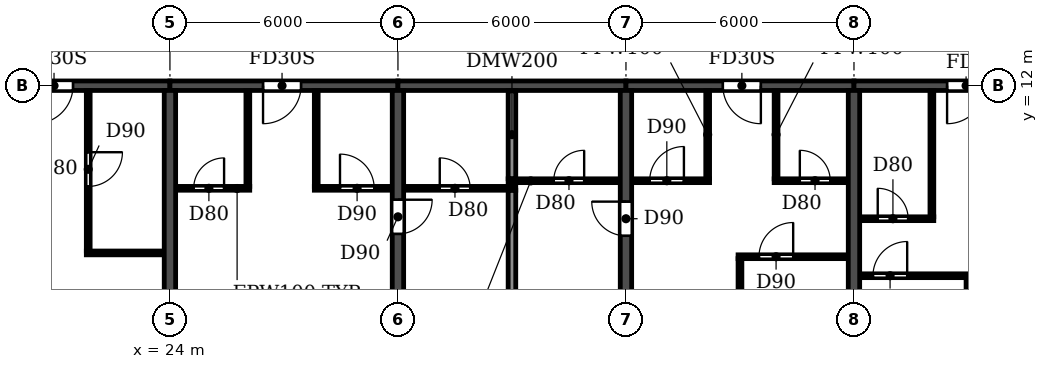
"""IFC4 building model, lengths in metres.
Left out: names, types, materials, properties, quantities, classifications, styles, units other than length and angle.
Written with IfcOpenShell. Run it as: python <this file> out.ifc"""

import sys

from ifc_helpers import new_model, si_unit, direction, frame, frame_2d, origin, place, context, subcontext, project, spatial, rectangle, extrude, element, fill, save


model = new_model("IFC4")
c1 = context("Model", 3, precision=1e-05, world=origin(), true_north=direction((0.0, 1.0)))
c2 = subcontext(c1, "Body", "Model", "MODEL_VIEW")
j1 = project(units=[si_unit("LENGTHUNIT", "METRE"), si_unit("PLANEANGLEUNIT", "RADIAN")], contexts=[c1])
p1 = place(None, origin())
s1 = spatial("IfcSite", under=j1, at=p1, CompositionType="ELEMENT")
p2 = place(p1, origin())
s2 = spatial("IfcBuilding", under=s1, at=p2, CompositionType="ELEMENT")
p3 = place(p2, frame((0.0, 0.0, 132.3)))
s3 = spatial("IfcBuildingStorey", under=s2, at=p3, CompositionType="ELEMENT", Elevation=132.3)
p4 = place(p3, frame((24.0, 0.2, 0.0), z_axis=(0.0, 0.0, 1.0), x_axis=(0.0, 1.0, 0.0)))
e1 = element("IfcWall", 1, at=p4, inside=s3, PredefinedType="SHEAR", context=c2, shape_type="SweptSolid", body=[
    extrude(rectangle(XDim=11.675, YDim=0.3, at=frame_2d((5.837, 0.0))), origin(), (0.0, 0.0, 1.0), 3.07),
])
p5 = place(p3, frame((30.0, 0.2, 0.0), z_axis=(0.0, 0.0, 1.0), x_axis=(0.0, 1.0, 0.0)))
e2 = element("IfcWall", 2, at=p5, inside=s3, PredefinedType="SHEAR", context=c2, shape_type="SweptSolid", body=[
    extrude(rectangle(XDim=11.675, YDim=0.3, at=frame_2d((5.837, 0.0))), origin(), (0.0, 0.0, 1.0), 3.07),
])
p6 = place(p5, frame((7.9, 0.0, 0.0)))
e3 = element("IfcOpeningElement", 3, at=p6, cuts=e2, PredefinedType="OPENING", context=c2, shape_type="SweptSolid", body=[
    extrude(rectangle(XDim=0.9, YDim=2.1, at=frame_2d((0.45, 1.05))), frame((0.0, 0.16, 0.0), z_axis=(0.0, -1.0, 0.0), x_axis=(1.0, 0.0, 0.0)), (0.0, 0.0, 1.0), 0.32),
])
p7 = place(p3, frame((36.0, 0.2, 0.0), z_axis=(0.0, 0.0, 1.0), x_axis=(0.0, 1.0, 0.0)))
e4 = element("IfcWall", 4, at=p7, inside=s3, PredefinedType="SHEAR", context=c2, shape_type="SweptSolid", body=[
    extrude(rectangle(XDim=11.675, YDim=0.3, at=frame_2d((5.837, 0.0))), origin(), (0.0, 0.0, 1.0), 3.07),
])
p8 = place(p7, frame((7.85, 0.0, 0.0)))
e5 = element("IfcOpeningElement", 5, at=p8, cuts=e4, PredefinedType="OPENING", context=c2, shape_type="SweptSolid", body=[
    extrude(rectangle(XDim=0.9, YDim=2.1, at=frame_2d((0.45, 1.05))), frame((0.0, 0.16, 0.0), z_axis=(0.0, -1.0, 0.0), x_axis=(1.0, 0.0, 0.0)), (0.0, 0.0, 1.0), 0.32),
])
p9 = place(p3, frame((42.0, 0.2, 0.0), z_axis=(0.0, 0.0, 1.0), x_axis=(0.0, 1.0, 0.0)))
e6 = element("IfcWall", 6, at=p9, inside=s3, PredefinedType="SHEAR", context=c2, shape_type="SweptSolid", body=[
    extrude(rectangle(XDim=11.675, YDim=0.3, at=frame_2d((5.837, 0.0))), origin(), (0.0, 0.0, 1.0), 3.07),
])
p10 = place(p3, frame((18.0, 12.0, 0.0), z_axis=(0.0, 0.0, 1.0), x_axis=(1.0, 0.0, 0.0)))
e7 = element("IfcWall", 7, at=p10, inside=s3, PredefinedType="SHEAR", context=c2, shape_type="SweptSolid", body=[
    extrude(rectangle(XDim=6.0, YDim=0.25, at=frame_2d((3.0, 0.0))), origin(), (0.0, 0.0, 1.0), 2.47),
])
p11 = place(p10, frame((2.45, 0.0, 0.0)))
e8 = element("IfcOpeningElement", 8, at=p11, cuts=e7, PredefinedType="OPENING", context=c2, shape_type="SweptSolid", body=[
    extrude(rectangle(XDim=1.0, YDim=2.1, at=frame_2d((0.5, 1.05))), frame((0.0, 0.135, 0.0), z_axis=(0.0, -1.0, 0.0), x_axis=(1.0, 0.0, 0.0)), (0.0, 0.0, 1.0), 0.27),
])
p12 = place(p3, frame((24.0, 12.0, 0.0), z_axis=(0.0, 0.0, 1.0), x_axis=(1.0, 0.0, 0.0)))
e9 = element("IfcWall", 9, at=p12, inside=s3, PredefinedType="SHEAR", context=c2, shape_type="SweptSolid", body=[
    extrude(rectangle(XDim=6.0, YDim=0.25, at=frame_2d((3.0, 0.0))), origin(), (0.0, 0.0, 1.0), 2.47),
])
p13 = place(p12, frame((2.45, 0.0, 0.0)))
e10 = element("IfcOpeningElement", 10, at=p13, cuts=e9, PredefinedType="OPENING", context=c2, shape_type="SweptSolid", body=[
    extrude(rectangle(XDim=1.0, YDim=2.1, at=frame_2d((0.5, 1.05))), frame((0.0, 0.135, 0.0), z_axis=(0.0, -1.0, 0.0), x_axis=(1.0, 0.0, 0.0)), (0.0, 0.0, 1.0), 0.27),
])
p14 = place(p3, frame((30.0, 12.0, 0.0), z_axis=(0.0, 0.0, 1.0), x_axis=(1.0, 0.0, 0.0)))
e11 = element("IfcWall", 11, at=p14, inside=s3, PredefinedType="SHEAR", context=c2, shape_type="SweptSolid", body=[
    extrude(rectangle(XDim=6.0, YDim=0.25, at=frame_2d((3.0, 0.0))), origin(), (0.0, 0.0, 1.0), 2.47),
])
p15 = place(p3, frame((36.0, 12.0, 0.0), z_axis=(0.0, 0.0, 1.0), x_axis=(1.0, 0.0, 0.0)))
e12 = element("IfcWall", 12, at=p15, inside=s3, PredefinedType="SHEAR", context=c2, shape_type="SweptSolid", body=[
    extrude(rectangle(XDim=6.0, YDim=0.25, at=frame_2d((3.0, 0.0))), origin(), (0.0, 0.0, 1.0), 2.47),
])
p16 = place(p15, frame((2.55, 0.0, 0.0)))
e13 = element("IfcOpeningElement", 13, at=p16, cuts=e12, PredefinedType="OPENING", context=c2, shape_type="SweptSolid", body=[
    extrude(rectangle(XDim=1.0, YDim=2.1, at=frame_2d((0.5, 1.05))), frame((0.0, 0.135, 0.0), z_axis=(0.0, -1.0, 0.0), x_axis=(1.0, 0.0, 0.0)), (0.0, 0.0, 1.0), 0.27),
])
p17 = place(p3, frame((42.0, 12.0, 0.0), z_axis=(0.0, 0.0, 1.0), x_axis=(1.0, 0.0, 0.0)))
e14 = element("IfcWall", 14, at=p17, inside=s3, PredefinedType="SHEAR", context=c2, shape_type="SweptSolid", body=[
    extrude(rectangle(XDim=6.0, YDim=0.25, at=frame_2d((3.0, 0.0))), origin(), (0.0, 0.0, 1.0), 2.47),
])
p18 = place(p17, frame((2.45, 0.0, 0.0)))
e15 = element("IfcOpeningElement", 15, at=p18, cuts=e14, PredefinedType="OPENING", context=c2, shape_type="SweptSolid", body=[
    extrude(rectangle(XDim=1.0, YDim=2.1, at=frame_2d((0.5, 1.05))), frame((0.0, 0.135, 0.0), z_axis=(0.0, -1.0, 0.0), x_axis=(1.0, 0.0, 0.0)), (0.0, 0.0, 1.0), 0.27),
])
p19 = place(p3, frame((33.0, 0.06, 0.0), z_axis=(0.0, 0.0, 1.0), x_axis=(0.0, 1.0, 0.0)))
e16 = element("IfcWall", 16, at=p19, inside=s3, PredefinedType="PARTITIONING", context=c2, shape_type="SweptSolid", body=[
    extrude(rectangle(XDim=9.19, YDim=0.2, at=frame_2d((4.595, 0.0))), origin(), (0.0, 0.0, 1.0), 3.07),
])
p20 = place(p3, frame((33.0, 9.55, 0.0), z_axis=(0.0, 0.0, 1.0), x_axis=(0.0, 1.0, 0.0)))
e17 = element("IfcWall", 17, at=p20, inside=s3, PredefinedType="PARTITIONING", context=c2, shape_type="SweptSolid", body=[
    extrude(rectangle(XDim=2.315, YDim=0.2, at=frame_2d((1.157, 0.0))), origin(), (0.0, 0.0, 1.0), 3.07),
])
p21 = place(p3, frame((42.16, 7.0, 0.0), z_axis=(0.0, 0.0, 1.0), x_axis=(1.0, 0.0, 0.0)))
e18 = element("IfcWall", 18, at=p21, inside=s3, PredefinedType="PARTITIONING", context=c2, shape_type="SweptSolid", body=[
    extrude(rectangle(XDim=2.89, YDim=0.1, at=frame_2d((1.445, 0.0))), origin(), (0.0, 0.0, 1.0), 3.07),
])
p22 = place(p21, frame((0.34, 0.0, 0.0)))
e19 = element("IfcOpeningElement", 19, at=p22, cuts=e18, PredefinedType="OPENING", context=c2, shape_type="SweptSolid", body=[
    extrude(rectangle(XDim=0.9, YDim=2.1, at=frame_2d((0.45, 1.05))), frame((0.0, 0.06, 0.0), z_axis=(0.0, -1.0, 0.0), x_axis=(1.0, 0.0, 0.0)), (0.0, 0.0, 1.0), 0.12),
])
p23 = place(p3, frame((38.95, 7.5, 0.0), z_axis=(0.0, 0.0, 1.0), x_axis=(1.0, 0.0, 0.0)))
e20 = element("IfcWall", 20, at=p23, inside=s3, PredefinedType="PARTITIONING", context=c2, shape_type="SweptSolid", body=[
    extrude(rectangle(XDim=2.89, YDim=0.1, at=frame_2d((1.445, 0.0))), origin(), (0.0, 0.0, 1.0), 3.07),
])
p24 = place(p23, frame((0.55, 0.0, 0.0)))
e21 = element("IfcOpeningElement", 21, at=p24, cuts=e20, PredefinedType="OPENING", context=c2, shape_type="SweptSolid", body=[
    extrude(rectangle(XDim=0.9, YDim=2.1, at=frame_2d((0.45, 1.05))), frame((0.0, 0.06, 0.0), z_axis=(0.0, -1.0, 0.0), x_axis=(1.0, 0.0, 0.0)), (0.0, 0.0, 1.0), 0.12),
])
p25 = place(p3, frame((21.8, 7.6, 0.0), z_axis=(0.0, 0.0, 1.0), x_axis=(1.0, 0.0, 0.0)))
e22 = element("IfcWall", 22, at=p25, inside=s3, PredefinedType="PARTITIONING", context=c2, shape_type="SweptSolid", body=[
    extrude(rectangle(XDim=2.04, YDim=0.1, at=frame_2d((1.02, 0.0))), origin(), (0.0, 0.0, 1.0), 3.07),
])
p26 = place(p3, frame((42.16, 8.5, 0.0), z_axis=(0.0, 0.0, 1.0), x_axis=(1.0, 0.0, 0.0)))
e23 = element("IfcWall", 23, at=p26, inside=s3, PredefinedType="PARTITIONING", context=c2, shape_type="SweptSolid", body=[
    extrude(rectangle(XDim=1.94, YDim=0.1, at=frame_2d((0.97, 0.0))), origin(), (0.0, 0.0, 1.0), 3.07),
])
p27 = place(p26, frame((0.465, 0.0, 0.0)))
e24 = element("IfcOpeningElement", 24, at=p27, cuts=e23, PredefinedType="OPENING", context=c2, shape_type="SweptSolid", body=[
    extrude(rectangle(XDim=0.8, YDim=2.1, at=frame_2d((0.4, 1.05))), frame((0.0, 0.06, 0.0), z_axis=(0.0, -1.0, 0.0), x_axis=(1.0, 0.0, 0.0)), (0.0, 0.0, 1.0), 0.12),
])
p28 = place(p3, frame((24.16, 9.3, 0.0), z_axis=(0.0, 0.0, 1.0), x_axis=(1.0, 0.0, 0.0)))
e25 = element("IfcWall", 25, at=p28, inside=s3, PredefinedType="PARTITIONING", context=c2, shape_type="SweptSolid", body=[
    extrude(rectangle(XDim=1.94, YDim=0.1, at=frame_2d((0.97, 0.0))), origin(), (0.0, 0.0, 1.0), 3.07),
])
p29 = place(p28, frame((0.465, 0.0, 0.0)))
e26 = element("IfcOpeningElement", 26, at=p29, cuts=e25, PredefinedType="OPENING", context=c2, shape_type="SweptSolid", body=[
    extrude(rectangle(XDim=0.8, YDim=2.1, at=frame_2d((0.4, 1.05))), frame((0.0, 0.06, 0.0), z_axis=(0.0, -1.0, 0.0), x_axis=(1.0, 0.0, 0.0)), (0.0, 0.0, 1.0), 0.12),
])
p30 = place(p3, frame((27.8, 9.3, 0.0), z_axis=(0.0, 0.0, 1.0), x_axis=(1.0, 0.0, 0.0)))
e27 = element("IfcWall", 27, at=p30, inside=s3, PredefinedType="PARTITIONING", context=c2, shape_type="SweptSolid", body=[
    extrude(rectangle(XDim=2.04, YDim=0.1, at=frame_2d((1.02, 0.0))), origin(), (0.0, 0.0, 1.0), 3.07),
])
p31 = place(p30, frame((0.675, 0.0, 0.0)))
e28 = element("IfcOpeningElement", 28, at=p31, cuts=e27, PredefinedType="OPENING", context=c2, shape_type="SweptSolid", body=[
    extrude(rectangle(XDim=0.9, YDim=2.1, at=frame_2d((0.45, 1.05))), frame((0.0, 0.06, 0.0), z_axis=(0.0, -1.0, 0.0), x_axis=(1.0, 0.0, 0.0)), (0.0, 0.0, 1.0), 0.12),
])
p32 = place(p3, frame((30.16, 9.3, 0.0), z_axis=(0.0, 0.0, 1.0), x_axis=(1.0, 0.0, 0.0)))
e29 = element("IfcWall", 29, at=p32, inside=s3, PredefinedType="PARTITIONING", context=c2, shape_type="SweptSolid", body=[
    extrude(rectangle(XDim=2.94, YDim=0.1, at=frame_2d((1.47, 0.0))), origin(), (0.0, 0.0, 1.0), 3.07),
])
p33 = place(p32, frame((0.94, 0.0, 0.0)))
e30 = element("IfcOpeningElement", 30, at=p33, cuts=e29, PredefinedType="OPENING", context=c2, shape_type="SweptSolid", body=[
    extrude(rectangle(XDim=0.8, YDim=2.1, at=frame_2d((0.4, 1.05))), frame((0.0, 0.06, 0.0), z_axis=(0.0, -1.0, 0.0), x_axis=(1.0, 0.0, 0.0)), (0.0, 0.0, 1.0), 0.12),
])
p34 = place(p3, frame((32.9, 9.5, 0.0), z_axis=(0.0, 0.0, 1.0), x_axis=(1.0, 0.0, 0.0)))
e31 = element("IfcWall", 31, at=p34, inside=s3, PredefinedType="PARTITIONING", context=c2, shape_type="SweptSolid", body=[
    extrude(rectangle(XDim=2.94, YDim=0.1, at=frame_2d((1.47, 0.0))), origin(), (0.0, 0.0, 1.0), 3.07),
])
p35 = place(p34, frame((1.2, 0.0, 0.0)))
e32 = element("IfcOpeningElement", 32, at=p35, cuts=e31, PredefinedType="OPENING", context=c2, shape_type="SweptSolid", body=[
    extrude(rectangle(XDim=0.8, YDim=2.1, at=frame_2d((0.4, 1.05))), frame((0.0, 0.06, 0.0), z_axis=(0.0, -1.0, 0.0), x_axis=(1.0, 0.0, 0.0)), (0.0, 0.0, 1.0), 0.12),
])
p36 = place(p3, frame((36.16, 9.5, 0.0), z_axis=(0.0, 0.0, 1.0), x_axis=(1.0, 0.0, 0.0)))
e33 = element("IfcWall", 33, at=p36, inside=s3, PredefinedType="PARTITIONING", context=c2, shape_type="SweptSolid", body=[
    extrude(rectangle(XDim=2.04, YDim=0.1, at=frame_2d((1.02, 0.0))), origin(), (0.0, 0.0, 1.0), 3.07),
])
p37 = place(p36, frame((0.465, 0.0, 0.0)))
e34 = element("IfcOpeningElement", 34, at=p37, cuts=e33, PredefinedType="OPENING", context=c2, shape_type="SweptSolid", body=[
    extrude(rectangle(XDim=0.9, YDim=2.1, at=frame_2d((0.45, 1.05))), frame((0.0, 0.06, 0.0), z_axis=(0.0, -1.0, 0.0), x_axis=(1.0, 0.0, 0.0)), (0.0, 0.0, 1.0), 0.12),
])
p38 = place(p3, frame((39.9, 9.5, 0.0), z_axis=(0.0, 0.0, 1.0), x_axis=(1.0, 0.0, 0.0)))
e35 = element("IfcWall", 35, at=p38, inside=s3, PredefinedType="PARTITIONING", context=c2, shape_type="SweptSolid", body=[
    extrude(rectangle(XDim=1.94, YDim=0.1, at=frame_2d((0.97, 0.0))), origin(), (0.0, 0.0, 1.0), 3.07),
])
p39 = place(p38, frame((0.675, 0.0, 0.0)))
e36 = element("IfcOpeningElement", 36, at=p39, cuts=e35, PredefinedType="OPENING", context=c2, shape_type="SweptSolid", body=[
    extrude(rectangle(XDim=0.8, YDim=2.1, at=frame_2d((0.4, 1.05))), frame((0.0, 0.06, 0.0), z_axis=(0.0, -1.0, 0.0), x_axis=(1.0, 0.0, 0.0)), (0.0, 0.0, 1.0), 0.12),
])
p40 = place(p3, frame((21.85, 7.65, 0.0), z_axis=(0.0, 0.0, 1.0), x_axis=(0.0, 1.0, 0.0)))
e37 = element("IfcWall", 37, at=p40, inside=s3, PredefinedType="PARTITIONING", context=c2, shape_type="SweptSolid", body=[
    extrude(rectangle(XDim=4.215, YDim=0.1, at=frame_2d((2.107, 0.0))), origin(), (0.0, 0.0, 1.0), 3.07),
])
p41 = place(p40, frame((1.7, 0.0, 0.0)))
e38 = element("IfcOpeningElement", 38, at=p41, cuts=e37, PredefinedType="OPENING", context=c2, shape_type="SweptSolid", body=[
    extrude(rectangle(XDim=0.9, YDim=2.1, at=frame_2d((0.45, 1.05))), frame((0.0, 0.06, 0.0), z_axis=(0.0, -1.0, 0.0), x_axis=(1.0, 0.0, 0.0)), (0.0, 0.0, 1.0), 0.12),
])
for number, where, z_axis, x_axis in (
    (39, (26.05, 9.35, 0.0), (0.0, 0.0, 1.0), (0.0, 1.0, 0.0)),
    (40, (27.85, 9.35, 0.0), (0.0, 0.0, 1.0), (0.0, 1.0, 0.0)),
):
    element("IfcWall", number, at=place(p3, frame(where, z_axis=z_axis, x_axis=x_axis)), inside=s3, PredefinedType="PARTITIONING", context=c2, shape_type="SweptSolid", body=[
        extrude(rectangle(XDim=2.515, YDim=0.1, at=frame_2d((1.257, 0.0))), origin(), (0.0, 0.0, 1.0), 3.07),
    ])
p42 = place(p3, frame((38.15, 9.55, 0.0), z_axis=(0.0, 0.0, 1.0), x_axis=(0.0, 1.0, 0.0)))
e41 = element("IfcWall", 41, at=p42, inside=s3, PredefinedType="PARTITIONING", context=c2, shape_type="SweptSolid", body=[
    extrude(rectangle(XDim=2.315, YDim=0.1, at=frame_2d((1.157, 0.0))), origin(), (0.0, 0.0, 1.0), 3.07),
])
p43 = place(p3, frame((39.0, 0.06, 0.0), z_axis=(0.0, 0.0, 1.0), x_axis=(0.0, 1.0, 0.0)))
e42 = element("IfcWall", 42, at=p43, inside=s3, PredefinedType="PARTITIONING", context=c2, shape_type="SweptSolid", body=[
    extrude(rectangle(XDim=7.39, YDim=0.1, at=frame_2d((3.695, 0.0))), origin(), (0.0, 0.0, 1.0), 3.07),
])
p44 = place(p3, frame((39.95, 9.55, 0.0), z_axis=(0.0, 0.0, 1.0), x_axis=(0.0, 1.0, 0.0)))
e43 = element("IfcWall", 43, at=p44, inside=s3, PredefinedType="PARTITIONING", context=c2, shape_type="SweptSolid", body=[
    extrude(rectangle(XDim=2.315, YDim=0.1, at=frame_2d((1.157, 0.0))), origin(), (0.0, 0.0, 1.0), 3.07),
])
p45 = place(p3, frame((44.05, 8.55, 0.0), z_axis=(0.0, 0.0, 1.0), x_axis=(0.0, 1.0, 0.0)))
e44 = element("IfcWall", 44, at=p45, inside=s3, PredefinedType="PARTITIONING", context=c2, shape_type="SweptSolid", body=[
    extrude(rectangle(XDim=3.315, YDim=0.1, at=frame_2d((1.657, 0.0))), origin(), (0.0, 0.0, 1.0), 3.07),
])
p46 = place(p3, frame((45.0, 0.06, 0.0), z_axis=(0.0, 0.0, 1.0), x_axis=(0.0, 1.0, 0.0)))
e45 = element("IfcWall", 45, at=p46, inside=s3, PredefinedType="PARTITIONING", context=c2, shape_type="SweptSolid", body=[
    extrude(rectangle(XDim=6.89, YDim=0.1, at=frame_2d((3.445, 0.0))), origin(), (0.0, 0.0, 1.0), 3.07),
])
p47 = place(p11, frame((1.0, 0.0, 0.0), z_axis=(0.0, 0.0, 1.0), x_axis=(-1.0, 0.0, 0.0)))
e46 = element("IfcDoor", 46, at=p47, inside=s3, OperationType="SINGLE_SWING_RIGHT", PredefinedType="DOOR", context=c2, shape_type="SweptSolid", body=[
    extrude(rectangle(XDim=1.0, YDim=2.1, at=frame_2d((0.5, 1.05))), frame((0.0, 0.025, 0.0), z_axis=(0.0, -1.0, 0.0), x_axis=(1.0, 0.0, 0.0)), (0.0, 0.0, 1.0), 0.05),
])
fill(e8, e46)
p48 = place(p41, frame((0.9, 0.0, 0.0), z_axis=(0.0, 0.0, 1.0), x_axis=(-1.0, 0.0, 0.0)))
e47 = element("IfcDoor", 47, at=p48, inside=s3, OperationType="SINGLE_SWING_LEFT", PredefinedType="DOOR", context=c2, shape_type="SweptSolid", body=[
    extrude(rectangle(XDim=0.9, YDim=2.1, at=frame_2d((0.45, 1.05))), frame((0.0, 0.025, 0.0), z_axis=(0.0, -1.0, 0.0), x_axis=(1.0, 0.0, 0.0)), (0.0, 0.0, 1.0), 0.05),
])
fill(e38, e47)
p49 = place(p33, origin())
e48 = element("IfcDoor", 48, at=p49, inside=s3, OperationType="SINGLE_SWING_LEFT", PredefinedType="DOOR", context=c2, shape_type="SweptSolid", body=[
    extrude(rectangle(XDim=0.8, YDim=2.1, at=frame_2d((0.4, 1.05))), frame((0.0, 0.025, 0.0), z_axis=(0.0, -1.0, 0.0), x_axis=(1.0, 0.0, 0.0)), (0.0, 0.0, 1.0), 0.05),
])
fill(e30, e48)
p50 = place(p29, origin())
e49 = element("IfcDoor", 49, at=p50, inside=s3, OperationType="SINGLE_SWING_RIGHT", PredefinedType="DOOR", context=c2, shape_type="SweptSolid", body=[
    extrude(rectangle(XDim=0.8, YDim=2.1, at=frame_2d((0.4, 1.05))), frame((0.0, 0.025, 0.0), z_axis=(0.0, -1.0, 0.0), x_axis=(1.0, 0.0, 0.0)), (0.0, 0.0, 1.0), 0.05),
])
fill(e26, e49)
p51 = place(p13, frame((1.0, 0.0, 0.0), z_axis=(0.0, 0.0, 1.0), x_axis=(-1.0, 0.0, 0.0)))
e50 = element("IfcDoor", 50, at=p51, inside=s3, OperationType="SINGLE_SWING_RIGHT", PredefinedType="DOOR", context=c2, shape_type="SweptSolid", body=[
    extrude(rectangle(XDim=1.0, YDim=2.1, at=frame_2d((0.5, 1.05))), frame((0.0, 0.025, 0.0), z_axis=(0.0, -1.0, 0.0), x_axis=(1.0, 0.0, 0.0)), (0.0, 0.0, 1.0), 0.05),
])
fill(e10, e50)
p52 = place(p31, origin())
e51 = element("IfcDoor", 51, at=p52, inside=s3, OperationType="SINGLE_SWING_LEFT", PredefinedType="DOOR", context=c2, shape_type="SweptSolid", body=[
    extrude(rectangle(XDim=0.9, YDim=2.1, at=frame_2d((0.45, 1.05))), frame((0.0, 0.025, 0.0), z_axis=(0.0, -1.0, 0.0), x_axis=(1.0, 0.0, 0.0)), (0.0, 0.0, 1.0), 0.05),
])
fill(e28, e51)
p53 = place(p6, frame((0.9, 0.0, 0.0), z_axis=(0.0, 0.0, 1.0), x_axis=(-1.0, 0.0, 0.0)))
e52 = element("IfcDoor", 52, at=p53, inside=s3, OperationType="SINGLE_SWING_LEFT", PredefinedType="DOOR", context=c2, shape_type="SweptSolid", body=[
    extrude(rectangle(XDim=0.9, YDim=2.1, at=frame_2d((0.45, 1.05))), frame((0.0, 0.025, 0.0), z_axis=(0.0, -1.0, 0.0), x_axis=(1.0, 0.0, 0.0)), (0.0, 0.0, 1.0), 0.05),
])
fill(e3, e52)
p54 = place(p35, origin())
e53 = element("IfcDoor", 53, at=p54, inside=s3, OperationType="SINGLE_SWING_RIGHT", PredefinedType="DOOR", context=c2, shape_type="SweptSolid", body=[
    extrude(rectangle(XDim=0.8, YDim=2.1, at=frame_2d((0.4, 1.05))), frame((0.0, 0.025, 0.0), z_axis=(0.0, -1.0, 0.0), x_axis=(1.0, 0.0, 0.0)), (0.0, 0.0, 1.0), 0.05),
])
fill(e32, e53)
p55 = place(p8, origin())
e54 = element("IfcDoor", 54, at=p55, inside=s3, OperationType="SINGLE_SWING_RIGHT", PredefinedType="DOOR", context=c2, shape_type="SweptSolid", body=[
    extrude(rectangle(XDim=0.9, YDim=2.1, at=frame_2d((0.45, 1.05))), frame((0.0, 0.025, 0.0), z_axis=(0.0, -1.0, 0.0), x_axis=(1.0, 0.0, 0.0)), (0.0, 0.0, 1.0), 0.05),
])
fill(e5, e54)
p56 = place(p37, origin())
e55 = element("IfcDoor", 55, at=p56, inside=s3, OperationType="SINGLE_SWING_RIGHT", PredefinedType="DOOR", context=c2, shape_type="SweptSolid", body=[
    extrude(rectangle(XDim=0.9, YDim=2.1, at=frame_2d((0.45, 1.05))), frame((0.0, 0.025, 0.0), z_axis=(0.0, -1.0, 0.0), x_axis=(1.0, 0.0, 0.0)), (0.0, 0.0, 1.0), 0.05),
])
fill(e34, e55)
p57 = place(p16, frame((1.0, 0.0, 0.0), z_axis=(0.0, 0.0, 1.0), x_axis=(-1.0, 0.0, 0.0)))
e56 = element("IfcDoor", 56, at=p57, inside=s3, OperationType="SINGLE_SWING_LEFT", PredefinedType="DOOR", context=c2, shape_type="SweptSolid", body=[
    extrude(rectangle(XDim=1.0, YDim=2.1, at=frame_2d((0.5, 1.05))), frame((0.0, 0.025, 0.0), z_axis=(0.0, -1.0, 0.0), x_axis=(1.0, 0.0, 0.0)), (0.0, 0.0, 1.0), 0.05),
])
fill(e13, e56)
p58 = place(p24, origin())
e57 = element("IfcDoor", 57, at=p58, inside=s3, OperationType="SINGLE_SWING_RIGHT", PredefinedType="DOOR", context=c2, shape_type="SweptSolid", body=[
    extrude(rectangle(XDim=0.9, YDim=2.1, at=frame_2d((0.45, 1.05))), frame((0.0, 0.025, 0.0), z_axis=(0.0, -1.0, 0.0), x_axis=(1.0, 0.0, 0.0)), (0.0, 0.0, 1.0), 0.05),
])
fill(e21, e57)
p59 = place(p39, origin())
e58 = element("IfcDoor", 58, at=p59, inside=s3, OperationType="SINGLE_SWING_LEFT", PredefinedType="DOOR", context=c2, shape_type="SweptSolid", body=[
    extrude(rectangle(XDim=0.8, YDim=2.1, at=frame_2d((0.4, 1.05))), frame((0.0, 0.025, 0.0), z_axis=(0.0, -1.0, 0.0), x_axis=(1.0, 0.0, 0.0)), (0.0, 0.0, 1.0), 0.05),
])
fill(e36, e58)
p60 = place(p22, origin())
e59 = element("IfcDoor", 59, at=p60, inside=s3, OperationType="SINGLE_SWING_RIGHT", PredefinedType="DOOR", context=c2, shape_type="SweptSolid", body=[
    extrude(rectangle(XDim=0.9, YDim=2.1, at=frame_2d((0.45, 1.05))), frame((0.0, 0.025, 0.0), z_axis=(0.0, -1.0, 0.0), x_axis=(1.0, 0.0, 0.0)), (0.0, 0.0, 1.0), 0.05),
])
fill(e19, e59)
p61 = place(p27, origin())
e60 = element("IfcDoor", 60, at=p61, inside=s3, OperationType="SINGLE_SWING_LEFT", PredefinedType="DOOR", context=c2, shape_type="SweptSolid", body=[
    extrude(rectangle(XDim=0.8, YDim=2.1, at=frame_2d((0.4, 1.05))), frame((0.0, 0.025, 0.0), z_axis=(0.0, -1.0, 0.0), x_axis=(1.0, 0.0, 0.0)), (0.0, 0.0, 1.0), 0.05),
])
fill(e24, e60)
p62 = place(p18, frame((1.0, 0.0, 0.0), z_axis=(0.0, 0.0, 1.0), x_axis=(-1.0, 0.0, 0.0)))
e61 = element("IfcDoor", 61, at=p62, inside=s3, OperationType="SINGLE_SWING_RIGHT", PredefinedType="DOOR", context=c2, shape_type="SweptSolid", body=[
    extrude(rectangle(XDim=1.0, YDim=2.1, at=frame_2d((0.5, 1.05))), frame((0.0, 0.025, 0.0), z_axis=(0.0, -1.0, 0.0), x_axis=(1.0, 0.0, 0.0)), (0.0, 0.0, 1.0), 0.05),
])
fill(e15, e61)
save(model, sys.argv[1])
